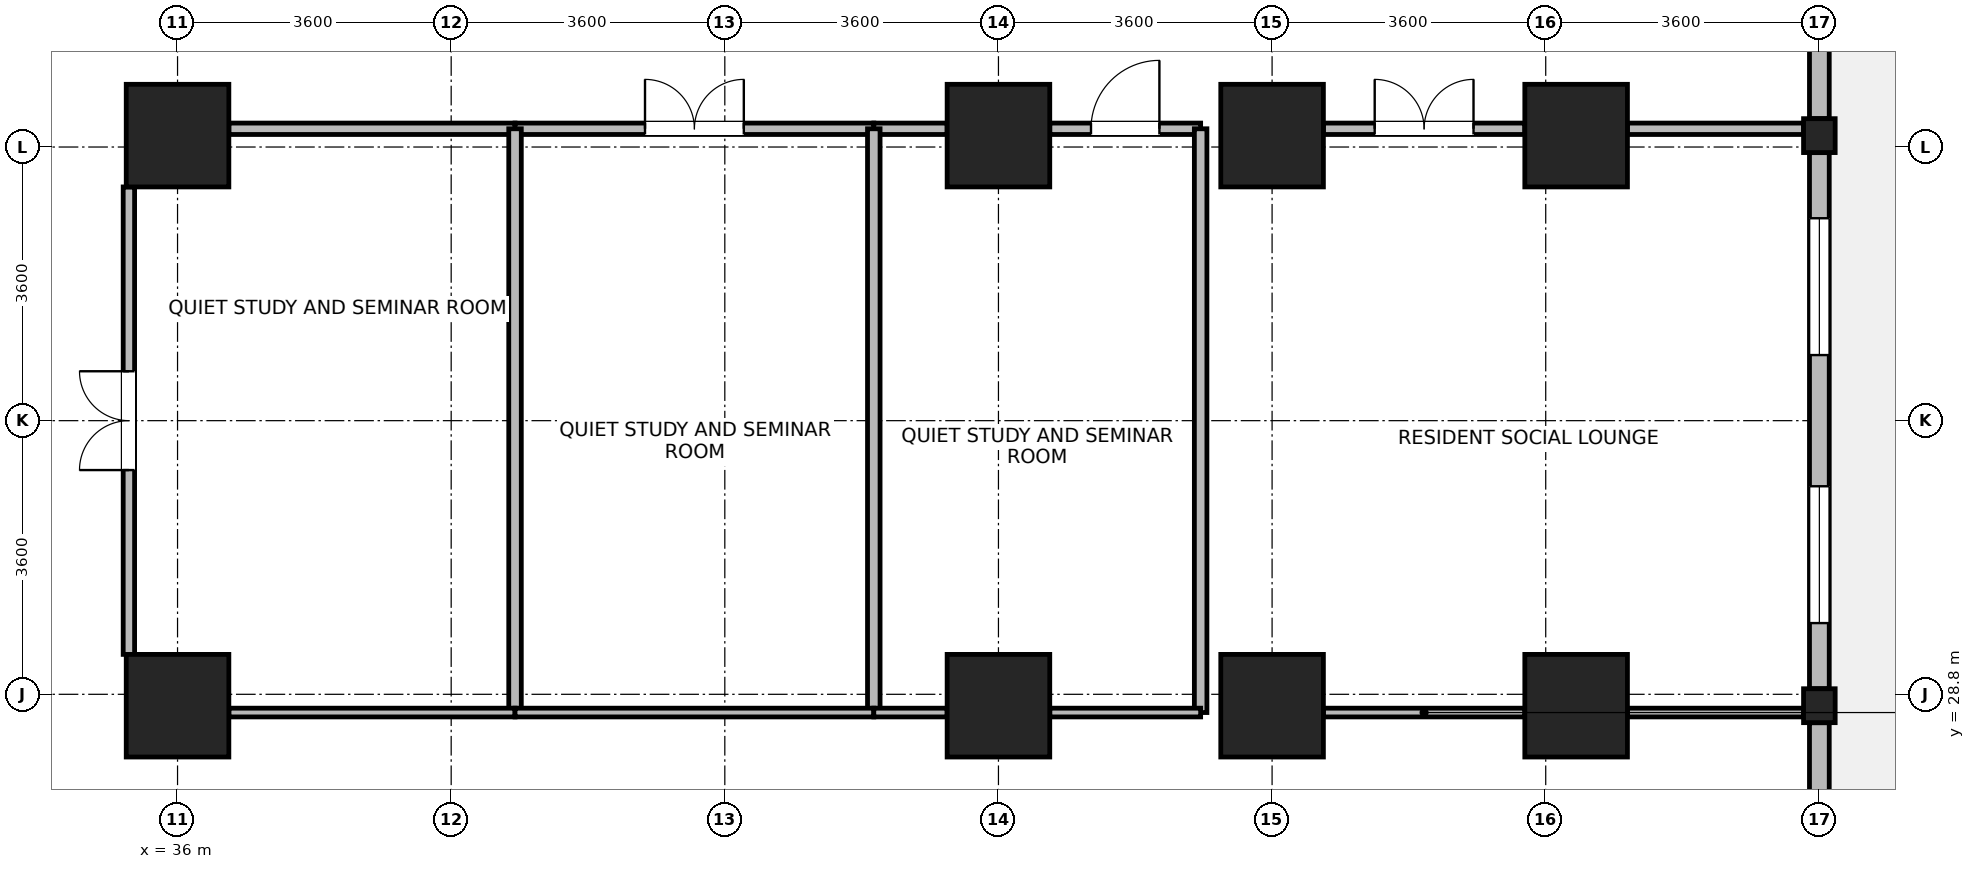
"""IFC4 building model, lengths in metres.
Left out: names, types, materials, properties, quantities, classifications, styles, units other than length and angle.
Written with IfcOpenShell. Run it as: python <this file> out.ifc"""

import sys

from ifc_helpers import new_model, si_unit, direction, frame, frame_2d, origin, origin_2d, place, context, subcontext, project, spatial, rectangle, i_section, extrude, source, transform, mapped, element, fill, save


model = new_model("IFC4")
c1 = context("Model", 3, precision=1e-05, world=origin(), true_north=direction((0.0, 1.0)))
c2 = subcontext(c1, "Body", "Model", "MODEL_VIEW")
j1 = project(units=[si_unit("LENGTHUNIT", "METRE"), si_unit("PLANEANGLEUNIT", "RADIAN")], contexts=[c1])
p1 = place(None, origin())
s1 = spatial("IfcSite", under=j1, at=p1, CompositionType="ELEMENT")
p2 = place(p1, origin())
s2 = spatial("IfcBuilding", under=s1, at=p2, CompositionType="ELEMENT")
p3 = place(p2, frame((0.0, 0.0, 29.0)))
s3 = spatial("IfcBuildingStorey", under=s2, at=p3, CompositionType="ELEMENT", Elevation=29.0)
m1 = source(origin(), c2, "Body", "SweptSolid", [
    extrude(rectangle(XDim=1.35, YDim=1.35, at=origin_2d()), origin(), (0.0, 0.0, 1.0), 3.7),
])
for number, where, z_axis, x_axis in (
    (1, (36.0, 28.65, 0.0), (0.0, 0.0, 1.0), (1.0, 0.0, 0.0)),
    (2, (36.0, 36.15, 0.0), (0.0, 0.0, 1.0), (1.0, 0.0, 0.0)),
    (3, (46.8, 28.65, 0.0), (0.0, 0.0, 1.0), (1.0, 0.0, 0.0)),
    (4, (46.8, 36.15, 0.0), (0.0, 0.0, 1.0), (1.0, 0.0, 0.0)),
    (5, (50.4, 28.65, 0.0), (0.0, 0.0, 1.0), (1.0, 0.0, 0.0)),
    (6, (50.4, 36.15, 0.0), (0.0, 0.0, 1.0), (1.0, 0.0, 0.0)),
    (7, (54.4, 28.65, 0.0), (0.0, 0.0, 1.0), (1.0, 0.0, 0.0)),
    (8, (54.4, 36.15, 0.0), (0.0, 0.0, 1.0), (1.0, 0.0, 0.0)),
):
    element("IfcColumn", number, at=place(p3, frame(where, z_axis=z_axis, x_axis=x_axis)), inside=s3, PredefinedType="COLUMN", context=c2, shape_type="MappedRepresentation", body=[
        mapped(m1, transform((0.0, 0.0, 0.0), x_axis=(1.0, 0.0, 0.0), y_axis=(0.0, 1.0, 0.0), z_axis=(0.0, 0.0, 1.0), scale=1.0)),
    ])
m2 = source(origin(), c2, "Body", "SweptSolid", [
    extrude(i_section(OverallWidth=0.416, OverallDepth=0.446, WebThickness=0.029, FlangeThickness=0.04, FilletRadius=0.015, at=origin_2d()), origin(), (0.0, 0.0, 1.0), 3.7),
])
for number, where, z_axis, x_axis in (
    (9, (57.6, 28.65, 0.0), (0.0, 0.0, 1.0), (1.0, 0.0, 0.0)),
    (10, (57.6, 36.15, 0.0), (0.0, 0.0, 1.0), (1.0, 0.0, 0.0)),
):
    element("IfcColumn", number, at=place(p3, frame(where, z_axis=z_axis, x_axis=x_axis)), inside=s3, PredefinedType="COLUMN", context=c2, shape_type="MappedRepresentation", body=[
        mapped(m2, transform((0.0, 0.0, 0.0), x_axis=(1.0, 0.0, 0.0), y_axis=(0.0, 1.0, 0.0), z_axis=(0.0, 0.0, 1.0), scale=1.0)),
    ])
p4 = place(p3, frame((57.6, 28.426, 0.0), z_axis=(0.0, 0.0, 1.0), x_axis=(0.0, -1.0, 0.0)))
e11 = element("IfcWall", 11, at=p4, inside=s3, PredefinedType="STANDARD", context=c2, shape_type="SweptSolid", body=[
    extrude(rectangle(XDim=6.602, YDim=0.26, at=frame_2d((3.301, 0.0))), origin(), (0.0, 0.0, 1.0), 2.93),
])
p5 = place(p4, frame((4.052, 0.0, 0.85)))
e12 = element("IfcOpeningElement", 12, at=p5, cuts=e11, PredefinedType="OPENING", context=c2, shape_type="SweptSolid", body=[
    extrude(rectangle(XDim=1.8, YDim=1.85, at=frame_2d((0.9, 0.925))), frame((0.0, 0.14, 0.0), z_axis=(0.0, -1.0, 0.0), x_axis=(1.0, 0.0, 0.0)), (0.0, 0.0, 1.0), 0.28),
])
p6 = place(p4, frame((2.298, 0.0, 0.85)))
e13 = element("IfcOpeningElement", 13, at=p6, cuts=e11, PredefinedType="OPENING", context=c2, shape_type="SweptSolid", body=[
    extrude(rectangle(XDim=0.95, YDim=1.75, at=frame_2d((0.475, 0.875))), frame((0.0, 0.14, 0.0), z_axis=(0.0, -1.0, 0.0), x_axis=(1.0, 0.0, 0.0)), (0.0, 0.0, 1.0), 0.28),
])
p7 = place(p3, frame((57.6, 35.926, 0.0), z_axis=(0.0, 0.0, 1.0), x_axis=(0.0, -1.0, 0.0)))
e14 = element("IfcWall", 14, at=p7, inside=s3, PredefinedType="STANDARD", context=c2, shape_type="SweptSolid", body=[
    extrude(rectangle(XDim=7.052, YDim=0.26, at=frame_2d((3.526, 0.0))), origin(), (0.0, 0.0, 1.0), 2.93),
])
p8 = place(p7, frame((0.863, 0.0, 0.85)))
e15 = element("IfcOpeningElement", 15, at=p8, cuts=e14, PredefinedType="OPENING", context=c2, shape_type="SweptSolid", body=[
    extrude(rectangle(XDim=1.8, YDim=1.85, at=frame_2d((0.9, 0.925))), frame((0.0, 0.14, 0.0), z_axis=(0.0, -1.0, 0.0), x_axis=(1.0, 0.0, 0.0)), (0.0, 0.0, 1.0), 0.28),
])
p9 = place(p7, frame((4.389, 0.0, 0.85)))
e16 = element("IfcOpeningElement", 16, at=p9, cuts=e14, PredefinedType="OPENING", context=c2, shape_type="SweptSolid", body=[
    extrude(rectangle(XDim=1.8, YDim=1.85, at=frame_2d((0.9, 0.925))), frame((0.0, 0.14, 0.0), z_axis=(0.0, -1.0, 0.0), x_axis=(1.0, 0.0, 0.0)), (0.0, 0.0, 1.0), 0.28),
])
p10 = place(p3, frame((57.6, 43.33, 0.0), z_axis=(0.0, 0.0, 1.0), x_axis=(0.0, -1.0, 0.0)))
e17 = element("IfcWall", 17, at=p10, inside=s3, PredefinedType="STANDARD", context=c2, shape_type="SweptSolid", body=[
    extrude(rectangle(XDim=6.956, YDim=0.26, at=frame_2d((3.478, 0.0))), origin(), (0.0, 0.0, 1.0), 3.43),
])
p11 = place(p10, frame((0.839, 0.0, 0.85)))
e18 = element("IfcOpeningElement", 18, at=p11, cuts=e17, PredefinedType="OPENING", context=c2, shape_type="SweptSolid", body=[
    extrude(rectangle(XDim=1.8, YDim=1.85, at=frame_2d((0.9, 0.925))), frame((0.0, 0.14, 0.0), z_axis=(0.0, -1.0, 0.0), x_axis=(1.0, 0.0, 0.0)), (0.0, 0.0, 1.0), 0.28),
])
p12 = place(p10, frame((3.003, 0.0, 0.85)))
e19 = element("IfcOpeningElement", 19, at=p12, cuts=e17, PredefinedType="OPENING", context=c2, shape_type="SweptSolid", body=[
    extrude(rectangle(XDim=0.95, YDim=1.75, at=frame_2d((0.475, 0.875))), frame((0.0, 0.14, 0.0), z_axis=(0.0, -1.0, 0.0), x_axis=(1.0, 0.0, 0.0)), (0.0, 0.0, 1.0), 0.28),
])
p13 = place(p3, frame((51.075, 36.24, 0.0), z_axis=(0.0, 0.0, 1.0), x_axis=(1.0, 0.0, 0.0)))
e20 = element("IfcWall", 20, at=p13, inside=s3, PredefinedType="PARTITIONING", context=c2, shape_type="SweptSolid", body=[
    extrude(rectangle(XDim=2.65, YDim=0.15, at=frame_2d((1.325, 0.0))), origin(), (0.0, 0.0, 1.0), 2.78),
])
p14 = place(p13, frame((0.675, 0.0, 0.0)))
e21 = element("IfcOpeningElement", 21, at=p14, cuts=e20, PredefinedType="OPENING", context=c2, shape_type="SweptSolid", body=[
    extrude(rectangle(XDim=1.3, YDim=2.12, at=frame_2d((0.65, 1.06))), frame((0.0, 0.085, 0.0), z_axis=(0.0, -1.0, 0.0), x_axis=(1.0, 0.0, 0.0)), (0.0, 0.0, 1.0), 0.17),
])
p15 = place(p3, frame((55.075, 36.24, 0.0), z_axis=(0.0, 0.0, 1.0), x_axis=(1.0, 0.0, 0.0)))
e22 = element("IfcWall", 22, at=p15, inside=s3, PredefinedType="PARTITIONING", context=c2, shape_type="SweptSolid", body=[
    extrude(rectangle(XDim=2.317, YDim=0.15, at=frame_2d((1.159, 0.0))), origin(), (0.0, 0.0, 1.0), 2.78),
])
p16 = place(p3, frame((35.36, 29.325, 0.0), z_axis=(0.0, 0.0, 1.0), x_axis=(0.0, 1.0, 0.0)))
e23 = element("IfcWall", 23, at=p16, inside=s3, PredefinedType="PARTITIONING", context=c2, shape_type="SweptSolid", body=[
    extrude(rectangle(XDim=6.15, YDim=0.15, at=frame_2d((3.075, 0.0))), origin(), (0.0, 0.0, 1.0), 3.43),
])
p17 = place(p16, frame((2.425, 0.0, 0.0)))
e24 = element("IfcOpeningElement", 24, at=p17, cuts=e23, PredefinedType="OPENING", context=c2, shape_type="SweptSolid", body=[
    extrude(rectangle(XDim=1.3, YDim=2.12, at=frame_2d((0.65, 1.06))), frame((0.0, 0.085, 0.0), z_axis=(0.0, -1.0, 0.0), x_axis=(1.0, 0.0, 0.0)), (0.0, 0.0, 1.0), 0.17),
])
p18 = place(p3, frame((36.675, 36.24, 0.0), z_axis=(0.0, 0.0, 1.0), x_axis=(1.0, 0.0, 0.0)))
e25 = element("IfcWall", 25, at=p18, inside=s3, PredefinedType="PARTITIONING", context=c2, shape_type="SweptSolid", body=[
    extrude(rectangle(XDim=3.765, YDim=0.15, at=frame_2d((1.882, 0.0))), origin(), (0.0, 0.0, 1.0), 2.78),
])
p19 = place(p3, frame((40.44, 36.24, 0.0), z_axis=(0.0, 0.0, 1.0), x_axis=(1.0, 0.0, 0.0)))
e26 = element("IfcWall", 26, at=p19, inside=s3, PredefinedType="PARTITIONING", context=c2, shape_type="SweptSolid", body=[
    extrude(rectangle(XDim=4.72, YDim=0.15, at=frame_2d((2.36, 0.0))), origin(), (0.0, 0.0, 1.0), 2.78),
])
p20 = place(p19, frame((1.71, 0.0, 0.0)))
e27 = element("IfcOpeningElement", 27, at=p20, cuts=e26, PredefinedType="OPENING", context=c2, shape_type="SweptSolid", body=[
    extrude(rectangle(XDim=1.3, YDim=2.12, at=frame_2d((0.65, 1.06))), frame((0.0, 0.085, 0.0), z_axis=(0.0, -1.0, 0.0), x_axis=(1.0, 0.0, 0.0)), (0.0, 0.0, 1.0), 0.17),
])
p21 = place(p3, frame((45.16, 36.24, 0.0), z_axis=(0.0, 0.0, 1.0), x_axis=(1.0, 0.0, 0.0)))
e28 = element("IfcWall", 28, at=p21, inside=s3, PredefinedType="PARTITIONING", context=c2, shape_type="SweptSolid", body=[
    extrude(rectangle(XDim=0.965, YDim=0.15, at=frame_2d((0.482, 0.0))), origin(), (0.0, 0.0, 1.0), 2.78),
])
p22 = place(p3, frame((47.475, 36.24, 0.0), z_axis=(0.0, 0.0, 1.0), x_axis=(1.0, 0.0, 0.0)))
e29 = element("IfcWall", 29, at=p22, inside=s3, PredefinedType="PARTITIONING", context=c2, shape_type="SweptSolid", body=[
    extrude(rectangle(XDim=1.985, YDim=0.15, at=frame_2d((0.992, 0.0))), origin(), (0.0, 0.0, 1.0), 2.78),
])
p23 = place(p22, frame((0.542, 0.0, 0.0)))
e30 = element("IfcOpeningElement", 30, at=p23, cuts=e29, PredefinedType="OPENING", context=c2, shape_type="SweptSolid", body=[
    extrude(rectangle(XDim=0.9, YDim=2.08, at=frame_2d((0.45, 1.04))), frame((0.0, 0.085, 0.0), z_axis=(0.0, -1.0, 0.0), x_axis=(1.0, 0.0, 0.0)), (0.0, 0.0, 1.0), 0.17),
])
p24 = place(p3, frame((51.075, 28.56, 0.0), z_axis=(0.0, 0.0, 1.0), x_axis=(1.0, 0.0, 0.0)))
e31 = element("IfcWall", 31, at=p24, inside=s3, PredefinedType="PARTITIONING", context=c2, shape_type="SweptSolid", body=[
    extrude(rectangle(XDim=2.65, YDim=0.115, at=frame_2d((1.325, 0.0))), origin(), (0.0, 0.0, 1.0), 2.78),
])
p25 = place(p3, frame((55.075, 28.56, 0.0), z_axis=(0.0, 0.0, 1.0), x_axis=(1.0, 0.0, 0.0)))
e32 = element("IfcWall", 32, at=p25, inside=s3, PredefinedType="PARTITIONING", context=c2, shape_type="SweptSolid", body=[
    extrude(rectangle(XDim=2.317, YDim=0.115, at=frame_2d((1.159, 0.0))), origin(), (0.0, 0.0, 1.0), 2.78),
])
for number, where, z_axis, x_axis in (
    (33, (40.44, 28.56, 0.0), (0.0, 0.0, 1.0), (0.0, 1.0, 0.0)),
    (34, (45.16, 28.56, 0.0), (0.0, 0.0, 1.0), (0.0, 1.0, 0.0)),
    (35, (49.46, 28.56, 0.0), (0.0, 0.0, 1.0), (0.0, 1.0, 0.0)),
):
    element("IfcWall", number, at=place(p3, frame(where, z_axis=z_axis, x_axis=x_axis)), inside=s3, PredefinedType="PARTITIONING", context=c2, shape_type="SweptSolid", body=[
        extrude(rectangle(XDim=7.68, YDim=0.165, at=frame_2d((3.84, 0.0))), origin(), (0.0, 0.0, 1.0), 3.43),
    ])
p26 = place(p3, frame((36.675, 28.56, 0.0), z_axis=(0.0, 0.0, 1.0), x_axis=(1.0, 0.0, 0.0)))
e36 = element("IfcWall", 36, at=p26, inside=s3, PredefinedType="PARTITIONING", context=c2, shape_type="SweptSolid", body=[
    extrude(rectangle(XDim=3.765, YDim=0.115, at=frame_2d((1.882, 0.0))), origin(), (0.0, 0.0, 1.0), 2.78),
])
p27 = place(p3, frame((40.44, 28.56, 0.0), z_axis=(0.0, 0.0, 1.0), x_axis=(1.0, 0.0, 0.0)))
e37 = element("IfcWall", 37, at=p27, inside=s3, PredefinedType="PARTITIONING", context=c2, shape_type="SweptSolid", body=[
    extrude(rectangle(XDim=4.72, YDim=0.115, at=frame_2d((2.36, 0.0))), origin(), (0.0, 0.0, 1.0), 2.78),
])
p28 = place(p3, frame((45.16, 28.56, 0.0), z_axis=(0.0, 0.0, 1.0), x_axis=(1.0, 0.0, 0.0)))
e38 = element("IfcWall", 38, at=p28, inside=s3, PredefinedType="PARTITIONING", context=c2, shape_type="SweptSolid", body=[
    extrude(rectangle(XDim=0.965, YDim=0.115, at=frame_2d((0.482, 0.0))), origin(), (0.0, 0.0, 1.0), 2.78),
])
p29 = place(p3, frame((47.475, 28.56, 0.0), z_axis=(0.0, 0.0, 1.0), x_axis=(1.0, 0.0, 0.0)))
e39 = element("IfcWall", 39, at=p29, inside=s3, PredefinedType="PARTITIONING", context=c2, shape_type="SweptSolid", body=[
    extrude(rectangle(XDim=1.985, YDim=0.115, at=frame_2d((0.992, 0.0))), origin(), (0.0, 0.0, 1.0), 2.78),
])
p30 = place(p8, origin())
e40 = element("IfcWindow", 40, at=p30, inside=s3, PartitioningType="SINGLE_PANEL", PredefinedType="WINDOW", context=c2, shape_type="SweptSolid", body=[
    extrude(rectangle(XDim=1.8, YDim=1.85, at=frame_2d((0.9, 0.925))), frame((0.0, 0.03, 0.0), z_axis=(0.0, -1.0, 0.0), x_axis=(1.0, 0.0, 0.0)), (0.0, 0.0, 1.0), 0.06),
])
fill(e15, e40)
p31 = place(p9, origin())
e41 = element("IfcWindow", 41, at=p31, inside=s3, PartitioningType="SINGLE_PANEL", PredefinedType="WINDOW", context=c2, shape_type="SweptSolid", body=[
    extrude(rectangle(XDim=1.8, YDim=1.85, at=frame_2d((0.9, 0.925))), frame((0.0, 0.03, 0.0), z_axis=(0.0, -1.0, 0.0), x_axis=(1.0, 0.0, 0.0)), (0.0, 0.0, 1.0), 0.06),
])
fill(e16, e41)
p32 = place(p14, origin())
e42 = element("IfcDoor", 42, at=p32, inside=s3, OperationType="DOUBLE_DOOR_SINGLE_SWING", PredefinedType="DOOR", context=c2, shape_type="SweptSolid", body=[
    extrude(rectangle(XDim=1.3, YDim=2.12, at=frame_2d((0.65, 1.06))), frame((0.0, 0.025, 0.0), z_axis=(0.0, -1.0, 0.0), x_axis=(1.0, 0.0, 0.0)), (0.0, 0.0, 1.0), 0.05),
])
fill(e21, e42)
p33 = place(p17, origin())
e43 = element("IfcDoor", 43, at=p33, inside=s3, OperationType="DOUBLE_DOOR_SINGLE_SWING", PredefinedType="DOOR", context=c2, shape_type="SweptSolid", body=[
    extrude(rectangle(XDim=1.3, YDim=2.12, at=frame_2d((0.65, 1.06))), frame((0.0, 0.025, 0.0), z_axis=(0.0, -1.0, 0.0), x_axis=(1.0, 0.0, 0.0)), (0.0, 0.0, 1.0), 0.05),
])
fill(e24, e43)
p34 = place(p20, origin())
e44 = element("IfcDoor", 44, at=p34, inside=s3, OperationType="DOUBLE_DOOR_SINGLE_SWING", PredefinedType="DOOR", context=c2, shape_type="SweptSolid", body=[
    extrude(rectangle(XDim=1.3, YDim=2.12, at=frame_2d((0.65, 1.06))), frame((0.0, 0.025, 0.0), z_axis=(0.0, -1.0, 0.0), x_axis=(1.0, 0.0, 0.0)), (0.0, 0.0, 1.0), 0.05),
])
fill(e27, e44)
p35 = place(p23, origin())
e45 = element("IfcDoor", 45, at=p35, inside=s3, OperationType="SINGLE_SWING_RIGHT", PredefinedType="DOOR", context=c2, shape_type="SweptSolid", body=[
    extrude(rectangle(XDim=0.9, YDim=2.08, at=frame_2d((0.45, 1.04))), frame((0.0, 0.025, 0.0), z_axis=(0.0, -1.0, 0.0), x_axis=(1.0, 0.0, 0.0)), (0.0, 0.0, 1.0), 0.05),
])
fill(e30, e45)
save(model, sys.argv[1])
